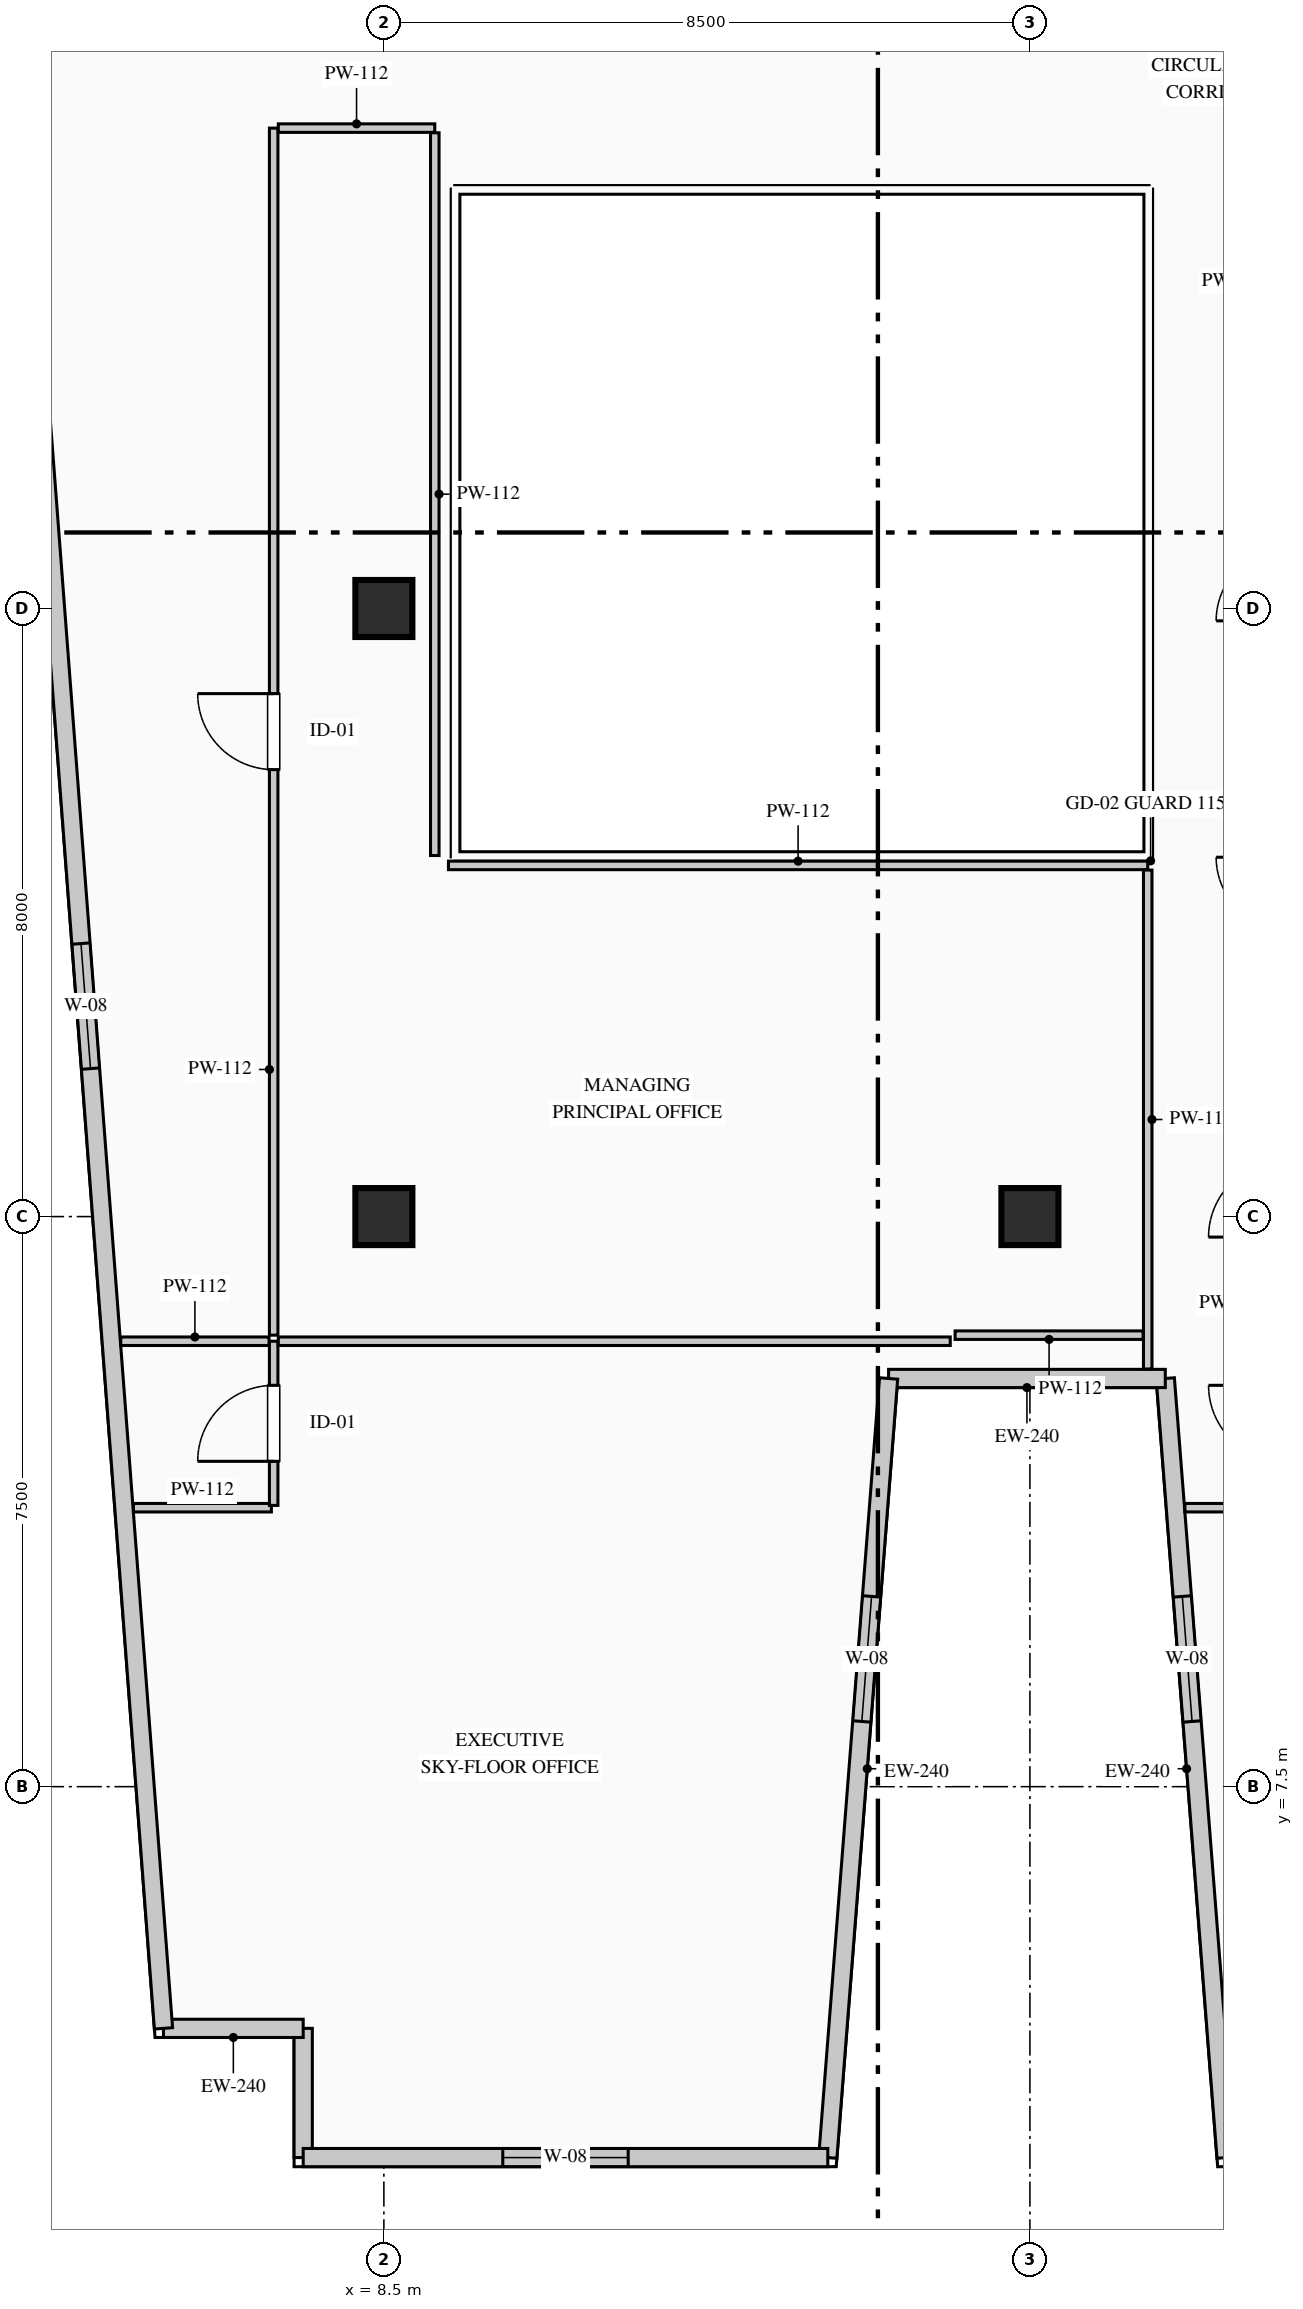
"""IFC4 building model, lengths in metres.
Left out: names, types, materials, properties, quantities, classifications, styles, units other than length and angle.
Written with IfcOpenShell. Run it as: python <this file> out.ifc"""

import sys

from ifc_helpers import new_model, si_unit, direction, frame, frame_2d, origin, origin_2d, place, context, subcontext, project, spatial, rectangle, extrude, element, fill, save


model = new_model("IFC4")
c1 = context("Model", 3, precision=1e-05, world=origin(), true_north=direction((0.0, 1.0)))
c2 = subcontext(c1, "Body", "Model", "MODEL_VIEW")
j1 = project(units=[si_unit("LENGTHUNIT", "METRE"), si_unit("PLANEANGLEUNIT", "RADIAN")], contexts=[c1])
p1 = place(None, origin())
s1 = spatial("IfcSite", under=j1, at=p1, CompositionType="ELEMENT")
p2 = place(p1, origin())
s2 = spatial("IfcBuilding", under=s1, at=p2, CompositionType="ELEMENT")
p3 = place(p2, frame((0.0, 0.0, 280.4)))
s3 = spatial("IfcBuildingStorey", under=s2, at=p3, CompositionType="ELEMENT", Elevation=280.4)
for number, where, z_axis, x_axis in (
    (1, (8.5, 15.0, 0.0), (0.0, 0.0, 1.0), (1.0, 0.0, 0.0)),
    (2, (8.5, 23.0, 0.0), (0.0, 0.0, 1.0), (1.0, 0.0, 0.0)),
    (3, (17.0, 15.0, 0.0), (0.0, 0.0, 1.0), (1.0, 0.0, 0.0)),
):
    element("IfcColumn", number, at=place(p3, frame(where, z_axis=z_axis, x_axis=x_axis)), inside=s3, PredefinedType="COLUMN", context=c2, shape_type="SweptSolid", body=[
        extrude(rectangle(XDim=0.75, YDim=0.75, at=origin_2d()), origin(), (0.0, 0.0, 1.0), 3.95),
    ])
p4 = place(p3, frame((7.438, 2.62, 0.0), z_axis=(0.0, 0.0, 1.0), x_axis=(0.0, 1.0, 0.0)))
e4 = element("IfcWall", 4, at=p4, inside=s3, PredefinedType="STANDARD", context=c2, shape_type="SweptSolid", body=[
    extrude(rectangle(XDim=1.7, YDim=0.24, at=frame_2d((0.85, 0.0))), origin(), (0.0, 0.0, 1.0), 3.7),
])
p5 = place(p3, frame((7.438, 4.32, 0.0), z_axis=(0.0, 0.0, 1.0), x_axis=(-1.0, 0.0, 0.0)))
e5 = element("IfcWall", 5, at=p5, inside=s3, PredefinedType="STANDARD", context=c2, shape_type="SweptSolid", body=[
    extrude(rectangle(XDim=1.838, YDim=0.24, at=frame_2d((0.919, 0.0))), origin(), (0.0, 0.0, 1.0), 3.7),
])
p6 = place(p3, frame((5.6, 4.32, 0.0), z_axis=(0.0, 0.0, 1.0), x_axis=(-0.075839920993, 0.997120006009, 0.0)))
e6 = element("IfcWall", 6, at=p6, inside=s3, PredefinedType="STANDARD", context=c2, shape_type="SweptSolid", body=[
    extrude(rectangle(XDim=37.468, YDim=0.24, at=frame_2d((18.734, 0.0))), origin(), (0.0, 0.0, 1.0), 3.7),
])
p7 = place(p6, frame((12.663, 0.0, 0.9)))
e7 = element("IfcOpeningElement", 7, at=p7, cuts=e6, PredefinedType="OPENING", context=c2, shape_type="SweptSolid", body=[
    extrude(rectangle(XDim=1.65, YDim=1.95, at=frame_2d((0.825, 0.975))), frame((0.0, 0.13, 0.0), z_axis=(0.0, -1.0, 0.0), x_axis=(1.0, 0.0, 0.0)), (0.0, 0.0, 1.0), 0.26),
])
p8 = place(p3, frame((19.581, 2.62, 0.0), z_axis=(0.0, 0.0, 1.0), x_axis=(-0.077816860153, 0.996967670627, 0.0)))
e8 = element("IfcWall", 8, at=p8, inside=s3, PredefinedType="STANDARD", context=c2, shape_type="SweptSolid", body=[
    extrude(rectangle(XDim=10.281, YDim=0.24, at=frame_2d((5.141, 0.0))), origin(), (0.0, 0.0, 1.0), 3.7),
])
p9 = place(p8, frame((5.755, 0.0, 0.9)))
e9 = element("IfcOpeningElement", 9, at=p9, cuts=e8, PredefinedType="OPENING", context=c2, shape_type="SweptSolid", body=[
    extrude(rectangle(XDim=1.65, YDim=1.95, at=frame_2d((0.825, 0.975))), frame((0.0, 0.13, 0.0), z_axis=(0.0, -1.0, 0.0), x_axis=(1.0, 0.0, 0.0)), (0.0, 0.0, 1.0), 0.26),
])
p10 = place(p3, frame((18.781, 12.87, 0.0), z_axis=(0.0, 0.0, 1.0), x_axis=(-1.0, 0.0, 0.0)))
e10 = element("IfcWall", 10, at=p10, inside=s3, PredefinedType="STANDARD", context=c2, shape_type="SweptSolid", body=[
    extrude(rectangle(XDim=3.641, YDim=0.24, at=frame_2d((1.82, 0.0))), origin(), (0.0, 0.0, 1.0), 3.7),
])
p11 = place(p3, frame((15.14, 12.87, 0.0), z_axis=(0.0, 0.0, 1.0), x_axis=(-0.077793257511, -0.996969512616, 0.0)))
e11 = element("IfcWall", 11, at=p11, inside=s3, PredefinedType="STANDARD", context=c2, shape_type="SweptSolid", body=[
    extrude(rectangle(XDim=10.281, YDim=0.24, at=frame_2d((5.141, 0.0))), origin(), (0.0, 0.0, 1.0), 3.7),
])
p12 = place(p11, frame((2.876, 0.0, 0.9)))
e12 = element("IfcOpeningElement", 12, at=p12, cuts=e11, PredefinedType="OPENING", context=c2, shape_type="SweptSolid", body=[
    extrude(rectangle(XDim=1.65, YDim=1.95, at=frame_2d((0.825, 0.975))), frame((0.0, 0.13, 0.0), z_axis=(0.0, -1.0, 0.0), x_axis=(1.0, 0.0, 0.0)), (0.0, 0.0, 1.0), 0.26),
])
p13 = place(p3, frame((14.341, 2.62, 0.0), z_axis=(0.0, 0.0, 1.0), x_axis=(-1.0, 0.0, 0.0)))
e13 = element("IfcWall", 13, at=p13, inside=s3, PredefinedType="STANDARD", context=c2, shape_type="SweptSolid", body=[
    extrude(rectangle(XDim=6.902, YDim=0.24, at=frame_2d((3.451, 0.0))), origin(), (0.0, 0.0, 1.0), 3.7),
])
p14 = place(p13, frame((2.626, 0.0, 0.9)))
e14 = element("IfcOpeningElement", 14, at=p14, cuts=e13, PredefinedType="OPENING", context=c2, shape_type="SweptSolid", body=[
    extrude(rectangle(XDim=1.65, YDim=1.95, at=frame_2d((0.825, 0.975))), frame((0.0, 0.13, 0.0), z_axis=(0.0, -1.0, 0.0), x_axis=(1.0, 0.0, 0.0)), (0.0, 0.0, 1.0), 0.26),
])
p15 = place(p3, frame((5.205, 11.17, 0.0), z_axis=(0.0, 0.0, 1.0), x_axis=(1.0, 0.0, 0.0)))
e15 = element("IfcWall", 15, at=p15, inside=s3, PredefinedType="PARTITIONING", context=c2, shape_type="SweptSolid", body=[
    extrude(rectangle(XDim=1.815, YDim=0.112, at=frame_2d((0.908, 0.0))), origin(), (0.0, 0.0, 1.0), 3.7),
])
p16 = place(p3, frame((7.05, 11.2, 0.0), z_axis=(0.0, 0.0, 1.0), x_axis=(0.0, 1.0, 0.0)))
e16 = element("IfcWall", 16, at=p16, inside=s3, PredefinedType="PARTITIONING", context=c2, shape_type="SweptSolid", body=[
    extrude(rectangle(XDim=2.16, YDim=0.112, at=frame_2d((1.08, 0.0))), origin(), (0.0, 0.0, 1.0), 3.7),
])
p17 = place(p16, frame((0.58, 0.0, 0.0)))
e17 = element("IfcOpeningElement", 17, at=p17, cuts=e16, PredefinedType="OPENING", context=c2, shape_type="SweptSolid", body=[
    extrude(rectangle(XDim=1.0, YDim=2.15, at=frame_2d((0.5, 1.075))), frame((0.0, 0.066, 0.0), z_axis=(0.0, -1.0, 0.0), x_axis=(1.0, 0.0, 0.0)), (0.0, 0.0, 1.0), 0.132),
])
p18 = place(p3, frame((5.038, 13.36, 0.0), z_axis=(0.0, 0.0, 1.0), x_axis=(1.0, 0.0, 0.0)))
e18 = element("IfcWall", 18, at=p18, inside=s3, PredefinedType="PARTITIONING", context=c2, shape_type="SweptSolid", body=[
    extrude(rectangle(XDim=1.951, YDim=0.112, at=frame_2d((0.976, 0.0))), origin(), (0.0, 0.0, 1.0), 3.7),
])
p19 = place(p3, frame((7.111, 13.36, 0.0), z_axis=(0.0, 0.0, 1.0), x_axis=(1.0, 0.0, 0.0)))
e19 = element("IfcWall", 19, at=p19, inside=s3, PredefinedType="PARTITIONING", context=c2, shape_type="SweptSolid", body=[
    extrude(rectangle(XDim=8.841, YDim=0.112, at=frame_2d((4.42, 0.0))), origin(), (0.0, 0.0, 1.0), 3.7),
])
p20 = place(p3, frame((19.039, 11.17, 0.0), z_axis=(0.0, 0.0, 1.0), x_axis=(1.0, 0.0, 0.0)))
e20 = element("IfcWall", 20, at=p20, inside=s3, PredefinedType="PARTITIONING", context=c2, shape_type="SweptSolid", body=[
    extrude(rectangle(XDim=1.281, YDim=0.112, at=frame_2d((0.64, 0.0))), origin(), (0.0, 0.0, 1.0), 3.7),
])
p21 = place(p3, frame((9.35, 19.62, 0.0), z_axis=(0.0, 0.0, 1.0), x_axis=(1.0, 0.0, 0.0)))
e21 = element("IfcWall", 21, at=p21, inside=s3, PredefinedType="PARTITIONING", context=c2, shape_type="SweptSolid", body=[
    extrude(rectangle(XDim=9.2, YDim=0.112, at=frame_2d((4.6, 0.0))), origin(), (0.0, 0.0, 1.0), 3.7),
])
p22 = place(p3, frame((18.55, 19.559, 0.0), z_axis=(0.0, 0.0, 1.0), x_axis=(0.0, -1.0, 0.0)))
e22 = element("IfcWall", 22, at=p22, inside=s3, PredefinedType="PARTITIONING", context=c2, shape_type="SweptSolid", body=[
    extrude(rectangle(XDim=6.564, YDim=0.112, at=frame_2d((3.282, 0.0))), origin(), (0.0, 0.0, 1.0), 3.7),
])
p23 = place(p3, frame((18.489, 13.44, 0.0), z_axis=(0.0, 0.0, 1.0), x_axis=(-1.0, 0.0, 0.0)))
e23 = element("IfcWall", 23, at=p23, inside=s3, PredefinedType="PARTITIONING", context=c2, shape_type="SweptSolid", body=[
    extrude(rectangle(XDim=2.474, YDim=0.112, at=frame_2d((1.237, 0.0))), origin(), (0.0, 0.0, 1.0), 3.7),
])
p24 = place(p3, frame((7.05, 13.44, 0.0), z_axis=(0.0, 0.0, 1.0), x_axis=(0.0, 1.0, 0.0)))
e24 = element("IfcWall", 24, at=p24, inside=s3, PredefinedType="PARTITIONING", context=c2, shape_type="SweptSolid", body=[
    extrude(rectangle(XDim=15.88, YDim=0.112, at=frame_2d((7.94, 0.0))), origin(), (0.0, 0.0, 1.0), 3.7),
])
p25 = place(p24, frame((7.44, 0.0, 0.0)))
e25 = element("IfcOpeningElement", 25, at=p25, cuts=e24, PredefinedType="OPENING", context=c2, shape_type="SweptSolid", body=[
    extrude(rectangle(XDim=1.0, YDim=2.15, at=frame_2d((0.5, 1.075))), frame((0.0, 0.066, 0.0), z_axis=(0.0, -1.0, 0.0), x_axis=(1.0, 0.0, 0.0)), (0.0, 0.0, 1.0), 0.132),
])
p26 = place(p3, frame((7.111, 29.32, 0.0), z_axis=(0.0, 0.0, 1.0), x_axis=(1.0, 0.0, 0.0)))
e26 = element("IfcWall", 26, at=p26, inside=s3, PredefinedType="PARTITIONING", context=c2, shape_type="SweptSolid", body=[
    extrude(rectangle(XDim=2.059, YDim=0.112, at=frame_2d((1.029, 0.0))), origin(), (0.0, 0.0, 1.0), 3.7),
])
p27 = place(p3, frame((9.17, 29.259, 0.0), z_axis=(0.0, 0.0, 1.0), x_axis=(0.0, -1.0, 0.0)))
e27 = element("IfcWall", 27, at=p27, inside=s3, PredefinedType="PARTITIONING", context=c2, shape_type="SweptSolid", body=[
    extrude(rectangle(XDim=9.509, YDim=0.112, at=frame_2d((4.754, 0.0))), origin(), (0.0, 0.0, 1.0), 3.285),
])
p28 = place(p7, origin())
e28 = element("IfcWindow", 28, at=p28, inside=s3, PartitioningType="SINGLE_PANEL", PredefinedType="WINDOW", context=c2, shape_type="SweptSolid", body=[
    extrude(rectangle(XDim=1.65, YDim=1.95, at=frame_2d((0.825, 0.975))), frame((0.0, 0.03, 0.0), z_axis=(0.0, -1.0, 0.0), x_axis=(1.0, 0.0, 0.0)), (0.0, 0.0, 1.0), 0.06),
])
fill(e7, e28)
p29 = place(p9, origin())
e29 = element("IfcWindow", 29, at=p29, inside=s3, PartitioningType="SINGLE_PANEL", PredefinedType="WINDOW", context=c2, shape_type="SweptSolid", body=[
    extrude(rectangle(XDim=1.65, YDim=1.95, at=frame_2d((0.825, 0.975))), frame((0.0, 0.03, 0.0), z_axis=(0.0, -1.0, 0.0), x_axis=(1.0, 0.0, 0.0)), (0.0, 0.0, 1.0), 0.06),
])
fill(e9, e29)
p30 = place(p12, origin())
e30 = element("IfcWindow", 30, at=p30, inside=s3, PartitioningType="SINGLE_PANEL", PredefinedType="WINDOW", context=c2, shape_type="SweptSolid", body=[
    extrude(rectangle(XDim=1.65, YDim=1.95, at=frame_2d((0.825, 0.975))), frame((0.0, 0.03, 0.0), z_axis=(0.0, -1.0, 0.0), x_axis=(1.0, 0.0, 0.0)), (0.0, 0.0, 1.0), 0.06),
])
fill(e12, e30)
p31 = place(p14, origin())
e31 = element("IfcWindow", 31, at=p31, inside=s3, PartitioningType="SINGLE_PANEL", PredefinedType="WINDOW", context=c2, shape_type="SweptSolid", body=[
    extrude(rectangle(XDim=1.65, YDim=1.95, at=frame_2d((0.825, 0.975))), frame((0.0, 0.03, 0.0), z_axis=(0.0, -1.0, 0.0), x_axis=(1.0, 0.0, 0.0)), (0.0, 0.0, 1.0), 0.06),
])
fill(e14, e31)
p32 = place(p17, origin())
e32 = element("IfcDoor", 32, at=p32, inside=s3, OperationType="SINGLE_SWING_LEFT", PredefinedType="DOOR", context=c2, shape_type="SweptSolid", body=[
    extrude(rectangle(XDim=1.0, YDim=2.15, at=frame_2d((0.5, 1.075))), frame((0.0, 0.025, 0.0), z_axis=(0.0, -1.0, 0.0), x_axis=(1.0, 0.0, 0.0)), (0.0, 0.0, 1.0), 0.05),
])
fill(e17, e32)
p33 = place(p25, origin())
e33 = element("IfcDoor", 33, at=p33, inside=s3, OperationType="SINGLE_SWING_RIGHT", PredefinedType="DOOR", context=c2, shape_type="SweptSolid", body=[
    extrude(rectangle(XDim=1.0, YDim=2.15, at=frame_2d((0.5, 1.075))), frame((0.0, 0.025, 0.0), z_axis=(0.0, -1.0, 0.0), x_axis=(1.0, 0.0, 0.0)), (0.0, 0.0, 1.0), 0.05),
])
fill(e25, e33)
save(model, sys.argv[1])
